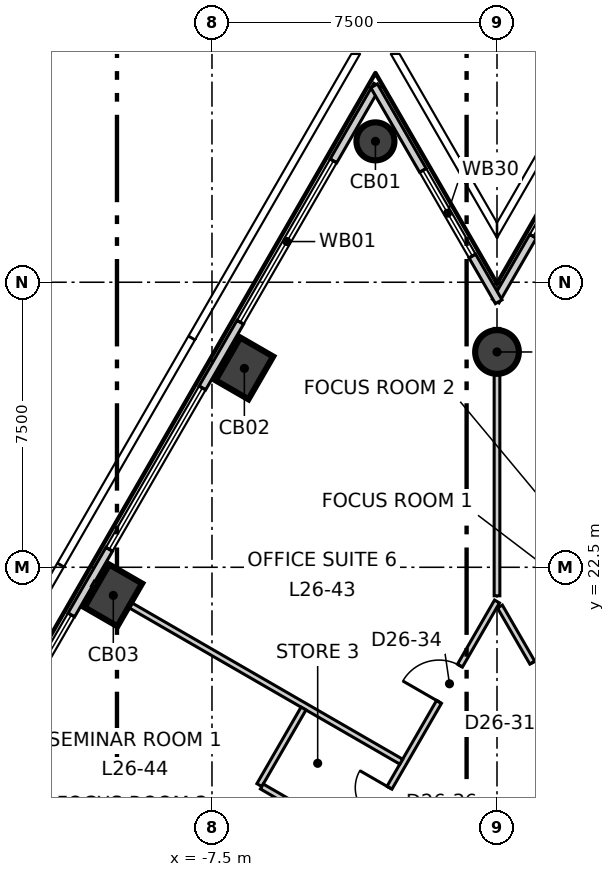
"""IFC4 building model, lengths in metres.
Left out: names, types, materials, properties, quantities, classifications, styles, units other than length and angle.
Written with IfcOpenShell. Run it as: python <this file> out.ifc"""

import sys

from ifc_helpers import new_model, si_unit, direction, frame, frame_2d, origin, origin_2d, place, context, subcontext, project, spatial, rectangle, circle, extrude, element, fill, save


model = new_model("IFC4")
c1 = context("Model", 3, precision=1e-05, world=origin(), true_north=direction((0.0, 1.0)))
c2 = subcontext(c1, "Body", "Model", "MODEL_VIEW")
j1 = project(units=[si_unit("LENGTHUNIT", "METRE"), si_unit("PLANEANGLEUNIT", "RADIAN")], contexts=[c1])
p1 = place(None, origin())
s1 = spatial("IfcSite", under=j1, at=p1, CompositionType="ELEMENT")
p2 = place(p1, origin())
s2 = spatial("IfcBuilding", under=s1, at=p2, CompositionType="ELEMENT")
p3 = place(p2, frame((0.0, 0.0, 116.3)))
s3 = spatial("IfcBuildingStorey", under=s2, at=p3, CompositionType="ELEMENT", Elevation=116.3)
p4 = place(p3, frame((-3.199, 33.707, -0.3), z_axis=(0.0, 0.0, 1.0), x_axis=(0.5, 0.866025403784, 0.0)))
e1 = element("IfcColumn", 1, at=p4, inside=s3, PredefinedType="COLUMN", context=c2, shape_type="SweptSolid", body=[
    extrude(circle(Radius=0.5, at=origin_2d()), origin(), (0.0, 0.0, 1.0), 4.0),
])
for number, where, z_axis, x_axis in (
    (2, (-6.648, 27.733, -0.3), (0.0, 0.0, 1.0), (0.5, 0.866, 0.0)),
    (3, (-10.097, 21.76, -0.3), (0.0, 0.0, 1.0), (0.5, 0.866, 0.0)),
):
    element("IfcColumn", number, at=place(p3, frame(where, z_axis=z_axis, x_axis=x_axis)), inside=s3, PredefinedType="COLUMN", context=c2, shape_type="SweptSolid", body=[
        extrude(rectangle(XDim=1.3, YDim=1.0, at=origin_2d()), origin(), (0.0, 0.0, 1.0), 4.0),
    ])
p5 = place(p3, frame((0.0, 28.165, -0.3), z_axis=(0.0, 0.0, 1.0), x_axis=(1.0, 0.0, 0.0)))
e4 = element("IfcColumn", 4, at=p5, inside=s3, PredefinedType="COLUMN", context=c2, shape_type="SweptSolid", body=[
    extrude(circle(Radius=0.575, at=origin_2d()), origin(), (0.0, 0.0, 1.0), 4.0),
])
p6 = place(p3, frame((-3.154, 35.185, 0.0), z_axis=(0.0, 0.0, 1.0), x_axis=(-0.499996704161, -0.866027306629, 0.0)))
e5 = element("IfcWall", 5, at=p6, inside=s3, PredefinedType="ELEMENTEDWALL", context=c2, shape_type="SweptSolid", body=[
    extrude(rectangle(XDim=57.769, YDim=0.2, at=frame_2d((28.884, 0.0))), origin(), (0.0, 0.0, 1.0), 3.7),
])
p7 = place(p6, frame((2.301, 0.0, 0.9)))
e6 = element("IfcOpeningElement", 6, at=p7, cuts=e5, PredefinedType="OPENING", context=c2, shape_type="SweptSolid", body=[
    extrude(rectangle(XDim=4.9, YDim=2.5, at=frame_2d((2.45, 1.25))), frame((0.0, 0.11, 0.0), z_axis=(0.0, -1.0, 0.0), x_axis=(1.0, 0.0, 0.0)), (0.0, 0.0, 1.0), 0.22),
])
p8 = place(p6, frame((9.199, 0.0, 0.9)))
e7 = element("IfcOpeningElement", 7, at=p8, cuts=e5, PredefinedType="OPENING", context=c2, shape_type="SweptSolid", body=[
    extrude(rectangle(XDim=4.9, YDim=2.5, at=frame_2d((2.45, 1.25))), frame((0.0, 0.11, 0.0), z_axis=(0.0, -1.0, 0.0), x_axis=(1.0, 0.0, 0.0)), (0.0, 0.0, 1.0), 0.22),
])
p9 = place(p6, frame((16.097, 0.0, 0.9)))
e8 = element("IfcOpeningElement", 8, at=p9, cuts=e5, PredefinedType="OPENING", context=c2, shape_type="SweptSolid", body=[
    extrude(rectangle(XDim=4.9, YDim=2.5, at=frame_2d((2.45, 1.25))), frame((0.0, 0.11, 0.0), z_axis=(0.0, -1.0, 0.0), x_axis=(1.0, 0.0, 0.0)), (0.0, 0.0, 1.0), 0.22),
])
p10 = place(p6, frame((22.995, 0.0, 0.9)))
e9 = element("IfcOpeningElement", 9, at=p10, cuts=e5, PredefinedType="OPENING", context=c2, shape_type="SweptSolid", body=[
    extrude(rectangle(XDim=4.9, YDim=2.5, at=frame_2d((2.45, 1.25))), frame((0.0, 0.11, 0.0), z_axis=(0.0, -1.0, 0.0), x_axis=(1.0, 0.0, 0.0)), (0.0, 0.0, 1.0), 0.22),
])
p11 = place(p6, frame((29.893, 0.0, 0.9)))
e10 = element("IfcOpeningElement", 10, at=p11, cuts=e5, PredefinedType="OPENING", context=c2, shape_type="SweptSolid", body=[
    extrude(rectangle(XDim=4.9, YDim=2.5, at=frame_2d((2.45, 1.25))), frame((0.0, 0.11, 0.0), z_axis=(0.0, -1.0, 0.0), x_axis=(1.0, 0.0, 0.0)), (0.0, 0.0, 1.0), 0.22),
])
p12 = place(p6, frame((36.791, 0.0, 0.9)))
e11 = element("IfcOpeningElement", 11, at=p12, cuts=e5, PredefinedType="OPENING", context=c2, shape_type="SweptSolid", body=[
    extrude(rectangle(XDim=4.9, YDim=2.5, at=frame_2d((2.45, 1.25))), frame((0.0, 0.11, 0.0), z_axis=(0.0, -1.0, 0.0), x_axis=(1.0, 0.0, 0.0)), (0.0, 0.0, 1.0), 0.22),
])
p13 = place(p6, frame((43.689, 0.0, 0.9)))
e12 = element("IfcOpeningElement", 12, at=p13, cuts=e5, PredefinedType="OPENING", context=c2, shape_type="SweptSolid", body=[
    extrude(rectangle(XDim=4.9, YDim=2.5, at=frame_2d((2.45, 1.25))), frame((0.0, 0.11, 0.0), z_axis=(0.0, -1.0, 0.0), x_axis=(1.0, 0.0, 0.0)), (0.0, 0.0, 1.0), 0.22),
])
p14 = place(p6, frame((50.586, 0.0, 0.9)))
e13 = element("IfcOpeningElement", 13, at=p14, cuts=e5, PredefinedType="OPENING", context=c2, shape_type="SweptSolid", body=[
    extrude(rectangle(XDim=4.9, YDim=2.5, at=frame_2d((2.45, 1.25))), frame((0.0, 0.11, 0.0), z_axis=(0.0, -1.0, 0.0), x_axis=(1.0, 0.0, 0.0)), (0.0, 0.0, 1.0), 0.22),
])
p15 = place(p3, frame((3.244, 35.185, 0.0), z_axis=(0.0, 0.0, 1.0), x_axis=(-0.499862072928, -0.866105021373, 0.0)))
e14 = element("IfcWall", 14, at=p15, inside=s3, PredefinedType="ELEMENTEDWALL", context=c2, shape_type="SweptSolid", body=[
    extrude(rectangle(XDim=6.559, YDim=0.2, at=frame_2d((3.28, 0.0))), origin(), (0.0, 0.0, 1.0), 3.7),
])
p16 = place(p15, frame((1.99, 0.0, 0.9)))
e15 = element("IfcOpeningElement", 15, at=p16, cuts=e14, PredefinedType="OPENING", context=c2, shape_type="SweptSolid", body=[
    extrude(rectangle(XDim=2.6, YDim=2.5, at=frame_2d((1.3, 1.25))), frame((0.0, 0.11, 0.0), z_axis=(0.0, -1.0, 0.0), x_axis=(1.0, 0.0, 0.0)), (0.0, 0.0, 1.0), 0.22),
])
p17 = place(p3, frame((0.045, 29.487, 0.0), z_axis=(0.0, 0.0, 1.0), x_axis=(-0.499878187048, 0.866095721103, 0.0)))
e16 = element("IfcWall", 16, at=p17, inside=s3, PredefinedType="ELEMENTEDWALL", context=c2, shape_type="SweptSolid", body=[
    extrude(rectangle(XDim=6.559, YDim=0.2, at=frame_2d((3.28, 0.0))), origin(), (0.0, 0.0, 1.0), 3.7),
])
p18 = place(p17, frame((1.39, 0.0, 0.9)))
e17 = element("IfcOpeningElement", 17, at=p18, cuts=e16, PredefinedType="OPENING", context=c2, shape_type="SweptSolid", body=[
    extrude(rectangle(XDim=2.6, YDim=2.5, at=frame_2d((1.3, 1.25))), frame((0.0, 0.11, 0.0), z_axis=(0.0, -1.0, 0.0), x_axis=(1.0, 0.0, 0.0)), (0.0, 0.0, 1.0), 0.22),
])
p19 = place(p3, frame((-5.454, 12.154, 0.0), z_axis=(0.0, 0.0, 1.0), x_axis=(0.500029221456, 0.866008532111, 0.0)))
e18 = element("IfcWall", 18, at=p19, inside=s3, PredefinedType="PARTITIONING", context=c2, shape_type="SweptSolid", body=[
    extrude(rectangle(XDim=10.907, YDim=0.15, at=frame_2d((5.454, 0.0))), origin(), (0.0, 0.0, 1.0), 3.7),
])
p20 = place(p19, frame((7.857, 0.0, 0.0)))
e19 = element("IfcOpeningElement", 19, at=p20, cuts=e18, PredefinedType="OPENING", context=c2, shape_type="SweptSolid", body=[
    extrude(rectangle(XDim=1.1, YDim=2.1, at=frame_2d((0.55, 1.05))), frame((0.0, 0.085, 0.0), z_axis=(0.0, -1.0, 0.0), x_axis=(1.0, 0.0, 0.0)), (0.0, 0.0, 1.0), 0.17),
])
p21 = place(p19, frame((2.248, 0.0, 0.0)))
e20 = element("IfcOpeningElement", 20, at=p21, cuts=e18, PredefinedType="OPENING", context=c2, shape_type="SweptSolid", body=[
    extrude(rectangle(XDim=1.0, YDim=2.1, at=frame_2d((0.5, 1.05))), frame((0.0, 0.085, 0.0), z_axis=(0.0, -1.0, 0.0), x_axis=(1.0, 0.0, 0.0)), (0.0, 0.0, 1.0), 0.17),
])
p22 = place(p19, frame((4.348, 0.0, 0.0)))
e21 = element("IfcOpeningElement", 21, at=p22, cuts=e18, PredefinedType="OPENING", context=c2, shape_type="SweptSolid", body=[
    extrude(rectangle(XDim=0.9, YDim=2.1, at=frame_2d((0.45, 1.05))), frame((0.0, 0.085, 0.0), z_axis=(0.0, -1.0, 0.0), x_axis=(1.0, 0.0, 0.0)), (0.0, 0.0, 1.0), 0.17),
])
p23 = place(p3, frame((-10.634, 22.07, 0.0), z_axis=(0.0, 0.0, 1.0), x_axis=(0.866005502057, -0.500034469219, 0.0)))
e22 = element("IfcWall", 22, at=p23, inside=s3, PredefinedType="PARTITIONING", context=c2, shape_type="SweptSolid", body=[
    extrude(rectangle(XDim=9.369, YDim=0.15, at=frame_2d((4.685, 0.0))), origin(), (0.0, 0.0, 1.0), 3.7),
])
p24 = place(p3, frame((-6.253, 16.769, 0.0), z_axis=(0.0, 0.0, 1.0), x_axis=(0.499719423372, 0.866187334186, 0.0)))
e23 = element("IfcWall", 23, at=p24, inside=s3, PredefinedType="PARTITIONING", context=c2, shape_type="SweptSolid", body=[
    extrude(rectangle(XDim=2.325, YDim=0.15, at=frame_2d((1.163, 0.0))), origin(), (0.0, 0.0, 1.0), 3.7),
])
p25 = place(p3, frame((-6.188, 16.732, 0.0), z_axis=(0.0, 0.0, 1.0), x_axis=(0.866004402611, -0.500036373335, 0.0)))
e24 = element("IfcWall", 24, at=p25, inside=s3, PredefinedType="PARTITIONING", context=c2, shape_type="SweptSolid", body=[
    extrude(rectangle(XDim=2.85, YDim=0.15, at=frame_2d((1.425, 0.0))), origin(), (0.0, 0.0, 1.0), 3.7),
])
p26 = place(p3, frame((0.0, 21.75, 0.0), z_axis=(0.0, 0.0, 1.0), x_axis=(0.0, 1.0, 0.0)))
e25 = element("IfcWall", 25, at=p26, inside=s3, PredefinedType="PARTITIONING", context=c2, shape_type="SweptSolid", body=[
    extrude(rectangle(XDim=7.035, YDim=0.15, at=frame_2d((3.518, 0.0))), origin(), (0.0, 0.0, 1.0), 3.15),
])
p27 = place(p3, frame((0.076, 21.468, 0.0), z_axis=(0.0, 0.0, 1.0), x_axis=(0.500006592492, -0.866021597574, 0.0)))
e26 = element("IfcWall", 26, at=p27, inside=s3, PredefinedType="PARTITIONING", context=c2, shape_type="SweptSolid", body=[
    extrude(rectangle(XDim=17.652, YDim=0.15, at=frame_2d((8.826, 0.0))), origin(), (0.0, 0.0, 1.0), 3.7),
])
p28 = place(p27, frame((6.303, 0.0, 0.0)))
e27 = element("IfcOpeningElement", 27, at=p28, cuts=e26, PredefinedType="OPENING", context=c2, shape_type="SweptSolid", body=[
    extrude(rectangle(XDim=1.1, YDim=2.1, at=frame_2d((0.55, 1.05))), frame((0.0, 0.085, 0.0), z_axis=(0.0, -1.0, 0.0), x_axis=(1.0, 0.0, 0.0)), (0.0, 0.0, 1.0), 0.17),
])
p29 = place(p27, frame((12.403, 0.0, 0.0)))
e28 = element("IfcOpeningElement", 28, at=p29, cuts=e26, PredefinedType="OPENING", context=c2, shape_type="SweptSolid", body=[
    extrude(rectangle(XDim=0.9, YDim=2.1, at=frame_2d((0.45, 1.05))), frame((0.0, 0.085, 0.0), z_axis=(0.0, -1.0, 0.0), x_axis=(1.0, 0.0, 0.0)), (0.0, 0.0, 1.0), 0.17),
])
p30 = place(p27, frame((9.503, 0.0, 0.0)))
e29 = element("IfcOpeningElement", 29, at=p30, cuts=e26, PredefinedType="OPENING", context=c2, shape_type="SweptSolid", body=[
    extrude(rectangle(XDim=1.0, YDim=2.1, at=frame_2d((0.5, 1.05))), frame((0.0, 0.085, 0.0), z_axis=(0.0, -1.0, 0.0), x_axis=(1.0, 0.0, 0.0)), (0.0, 0.0, 1.0), 0.17),
])
p31 = place(p27, frame((1.708, 0.0, 0.0)))
e30 = element("IfcOpeningElement", 30, at=p31, cuts=e26, PredefinedType="OPENING", context=c2, shape_type="SweptSolid", body=[
    extrude(rectangle(XDim=1.1, YDim=2.1, at=frame_2d((0.55, 1.05))), frame((0.0, 0.085, 0.0), z_axis=(0.0, -1.0, 0.0), x_axis=(1.0, 0.0, 0.0)), (0.0, 0.0, 1.0), 0.17),
])
p32 = place(p7, origin())
e31 = element("IfcWindow", 31, at=p32, inside=s3, PartitioningType="SINGLE_PANEL", PredefinedType="WINDOW", context=c2, shape_type="SweptSolid", body=[
    extrude(rectangle(XDim=4.9, YDim=2.5, at=frame_2d((2.45, 1.25))), frame((0.0, 0.03, 0.0), z_axis=(0.0, -1.0, 0.0), x_axis=(1.0, 0.0, 0.0)), (0.0, 0.0, 1.0), 0.06),
])
fill(e6, e31)
p33 = place(p8, origin())
e32 = element("IfcWindow", 32, at=p33, inside=s3, PartitioningType="SINGLE_PANEL", PredefinedType="WINDOW", context=c2, shape_type="SweptSolid", body=[
    extrude(rectangle(XDim=4.9, YDim=2.5, at=frame_2d((2.45, 1.25))), frame((0.0, 0.03, 0.0), z_axis=(0.0, -1.0, 0.0), x_axis=(1.0, 0.0, 0.0)), (0.0, 0.0, 1.0), 0.06),
])
fill(e7, e32)
p34 = place(p9, origin())
e33 = element("IfcWindow", 33, at=p34, inside=s3, PartitioningType="SINGLE_PANEL", PredefinedType="WINDOW", context=c2, shape_type="SweptSolid", body=[
    extrude(rectangle(XDim=4.9, YDim=2.5, at=frame_2d((2.45, 1.25))), frame((0.0, 0.03, 0.0), z_axis=(0.0, -1.0, 0.0), x_axis=(1.0, 0.0, 0.0)), (0.0, 0.0, 1.0), 0.06),
])
fill(e8, e33)
p35 = place(p16, origin())
e34 = element("IfcWindow", 34, at=p35, inside=s3, PartitioningType="SINGLE_PANEL", PredefinedType="WINDOW", context=c2, shape_type="SweptSolid", body=[
    extrude(rectangle(XDim=2.6, YDim=2.5, at=frame_2d((1.3, 1.25))), frame((0.0, 0.03, 0.0), z_axis=(0.0, -1.0, 0.0), x_axis=(1.0, 0.0, 0.0)), (0.0, 0.0, 1.0), 0.06),
])
fill(e15, e34)
p36 = place(p18, origin())
e35 = element("IfcWindow", 35, at=p36, inside=s3, PartitioningType="SINGLE_PANEL", PredefinedType="WINDOW", context=c2, shape_type="SweptSolid", body=[
    extrude(rectangle(XDim=2.6, YDim=2.5, at=frame_2d((1.3, 1.25))), frame((0.0, 0.03, 0.0), z_axis=(0.0, -1.0, 0.0), x_axis=(1.0, 0.0, 0.0)), (0.0, 0.0, 1.0), 0.06),
])
fill(e17, e35)
p37 = place(p31, origin())
e36 = element("IfcDoor", 36, at=p37, inside=s3, OperationType="SINGLE_SWING_LEFT", PredefinedType="DOOR", context=c2, shape_type="SweptSolid", body=[
    extrude(rectangle(XDim=1.1, YDim=2.1, at=frame_2d((0.55, 1.05))), frame((0.0, 0.025, 0.0), z_axis=(0.0, -1.0, 0.0), x_axis=(1.0, 0.0, 0.0)), (0.0, 0.0, 1.0), 0.05),
])
fill(e30, e36)
p38 = place(p20, origin())
e37 = element("IfcDoor", 37, at=p38, inside=s3, OperationType="SINGLE_SWING_RIGHT", PredefinedType="DOOR", context=c2, shape_type="SweptSolid", body=[
    extrude(rectangle(XDim=1.1, YDim=2.1, at=frame_2d((0.55, 1.05))), frame((0.0, 0.025, 0.0), z_axis=(0.0, -1.0, 0.0), x_axis=(1.0, 0.0, 0.0)), (0.0, 0.0, 1.0), 0.05),
])
fill(e19, e37)
p39 = place(p22, origin())
e38 = element("IfcDoor", 38, at=p39, inside=s3, OperationType="SINGLE_SWING_LEFT", PredefinedType="DOOR", context=c2, shape_type="SweptSolid", body=[
    extrude(rectangle(XDim=0.9, YDim=2.1, at=frame_2d((0.45, 1.05))), frame((0.0, 0.025, 0.0), z_axis=(0.0, -1.0, 0.0), x_axis=(1.0, 0.0, 0.0)), (0.0, 0.0, 1.0), 0.05),
])
fill(e21, e38)
save(model, sys.argv[1])
